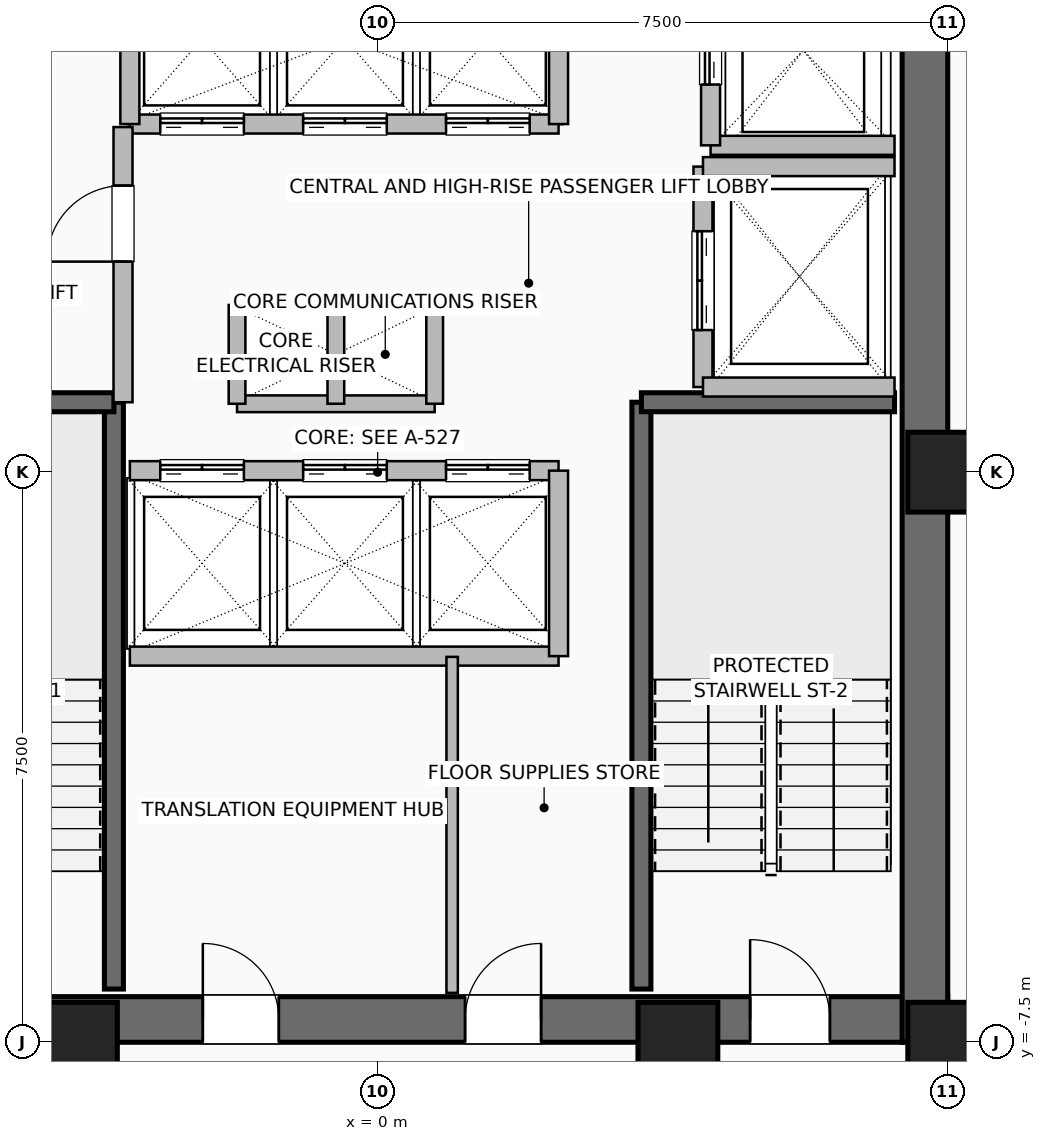
"""IFC4 building model, lengths in metres.
Left out: names, types, materials, properties, quantities, classifications, styles, units other than length and angle.
Written with IfcOpenShell. Run it as: python <this file> out.ifc"""

import sys

from ifc_helpers import new_model, si_unit, direction, frame, frame_2d, origin, origin_2d, place, context, subcontext, project, spatial, rectangle, hollow_rectangle, extrude, element, fill, save


model = new_model("IFC4")
c1 = context("Model", 3, precision=1e-05, world=origin(), true_north=direction((0.0, 1.0)))
c2 = subcontext(c1, "Body", "Model", "MODEL_VIEW")
j1 = project(units=[si_unit("LENGTHUNIT", "METRE"), si_unit("PLANEANGLEUNIT", "RADIAN")], contexts=[c1])
p1 = place(None, origin())
s1 = spatial("IfcSite", under=j1, at=p1, CompositionType="ELEMENT")
p2 = place(p1, origin())
s2 = spatial("IfcBuilding", under=s1, at=p2, CompositionType="ELEMENT")
p3 = place(p2, frame((0.0, 0.0, 104.8)))
s3 = spatial("IfcBuildingStorey", under=s2, at=p3, CompositionType="ELEMENT", Elevation=104.8)
for number, where, z_axis, x_axis in (
    (1, (-3.95, -7.5, 0.0), (0.0, 0.0, 1.0), (1.0, 0.0, 0.0)),
    (2, (3.95, -7.5, 0.0), (0.0, 0.0, 1.0), (1.0, 0.0, 0.0)),
    (3, (7.5, -7.5, 0.0), (0.0, 0.0, 1.0), (1.0, 0.0, 0.0)),
    (4, (7.5, 0.0, 0.0), (0.0, 0.0, 1.0), (1.0, 0.0, 0.0)),
):
    element("IfcColumn", number, at=place(p3, frame(where, z_axis=z_axis, x_axis=x_axis)), inside=s3, PredefinedType="COLUMN", context=c2, shape_type="SweptSolid", body=[
        extrude(hollow_rectangle(XDim=1.05, YDim=1.05, WallThickness=0.05, at=origin_2d()), origin(), (0.0, 0.0, 1.0), 3.6),
    ])
p4 = place(p3, frame((-7.5, -7.2, 0.0), z_axis=(0.0, 0.0, 1.0), x_axis=(1.0, 0.0, 0.0)))
e5 = element("IfcWall", 5, at=p4, inside=s3, PredefinedType="SHEAR", context=c2, shape_type="SweptSolid", body=[
    extrude(rectangle(XDim=15.0, YDim=0.6, at=frame_2d((7.5, 0.0))), origin(), (0.0, 0.0, 1.0), 3.36),
])
p5 = place(p4, frame((1.55, 0.0, 0.0)))
e6 = element("IfcOpeningElement", 6, at=p5, cuts=e5, PredefinedType="OPENING", context=c2, shape_type="SweptSolid", body=[
    extrude(rectangle(XDim=1.05, YDim=2.08, at=frame_2d((0.525, 1.04))), frame((0.0, 0.31, 0.0), z_axis=(0.0, -1.0, 0.0), x_axis=(1.0, 0.0, 0.0)), (0.0, 0.0, 1.0), 0.62),
])
p6 = place(p4, frame((12.4, 0.0, 0.0)))
e7 = element("IfcOpeningElement", 7, at=p6, cuts=e5, PredefinedType="OPENING", context=c2, shape_type="SweptSolid", body=[
    extrude(rectangle(XDim=1.05, YDim=2.08, at=frame_2d((0.525, 1.04))), frame((0.0, 0.31, 0.0), z_axis=(0.0, -1.0, 0.0), x_axis=(1.0, 0.0, 0.0)), (0.0, 0.0, 1.0), 0.62),
])
p7 = place(p4, frame((5.2, 0.0, 0.0)))
e8 = element("IfcOpeningElement", 8, at=p7, cuts=e5, PredefinedType="OPENING", context=c2, shape_type="SweptSolid", body=[
    extrude(rectangle(XDim=1.0, YDim=2.08, at=frame_2d((0.5, 1.04))), frame((0.0, 0.31, 0.0), z_axis=(0.0, -1.0, 0.0), x_axis=(1.0, 0.0, 0.0)), (0.0, 0.0, 1.0), 0.62),
])
p8 = place(p4, frame((8.65, 0.0, 0.0)))
e9 = element("IfcOpeningElement", 9, at=p8, cuts=e5, PredefinedType="OPENING", context=c2, shape_type="SweptSolid", body=[
    extrude(rectangle(XDim=1.0, YDim=2.08, at=frame_2d((0.5, 1.04))), frame((0.0, 0.31, 0.0), z_axis=(0.0, -1.0, 0.0), x_axis=(1.0, 0.0, 0.0)), (0.0, 0.0, 1.0), 0.62),
])
p9 = place(p3, frame((7.2, -7.5, 0.0), z_axis=(0.0, 0.0, 1.0), x_axis=(0.0, 1.0, 0.0)))
e10 = element("IfcWall", 10, at=p9, inside=s3, PredefinedType="SHEAR", context=c2, shape_type="SweptSolid", body=[
    extrude(rectangle(XDim=15.0, YDim=0.6, at=frame_2d((7.5, 0.0))), origin(), (0.0, 0.0, 1.0), 3.36),
])
p10 = place(p3, frame((-3.47, -6.8, 0.0), z_axis=(0.0, 0.0, 1.0), x_axis=(0.0, 1.0, 0.0)))
e11 = element("IfcWall", 11, at=p10, inside=s3, PredefinedType="SHEAR", context=c2, shape_type="SweptSolid", body=[
    extrude(rectangle(XDim=7.72, YDim=0.25, at=frame_2d((3.86, 0.0))), origin(), (0.0, 0.0, 1.0), 3.36),
])
p11 = place(p3, frame((-6.8, 0.92, 0.0), z_axis=(0.0, 0.0, 1.0), x_axis=(1.0, 0.0, 0.0)))
e12 = element("IfcWall", 12, at=p11, inside=s3, PredefinedType="SHEAR", context=c2, shape_type="SweptSolid", body=[
    extrude(rectangle(XDim=3.33, YDim=0.25, at=frame_2d((1.665, 0.0))), origin(), (0.0, 0.0, 1.0), 3.36),
])
p12 = place(p3, frame((3.47, -6.8, 0.0), z_axis=(0.0, 0.0, 1.0), x_axis=(0.0, 1.0, 0.0)))
e13 = element("IfcWall", 13, at=p12, inside=s3, PredefinedType="SHEAR", context=c2, shape_type="SweptSolid", body=[
    extrude(rectangle(XDim=7.72, YDim=0.25, at=frame_2d((3.86, 0.0))), origin(), (0.0, 0.0, 1.0), 3.36),
])
p13 = place(p3, frame((3.47, 0.92, 0.0), z_axis=(0.0, 0.0, 1.0), x_axis=(1.0, 0.0, 0.0)))
e14 = element("IfcWall", 14, at=p13, inside=s3, PredefinedType="SHEAR", context=c2, shape_type="SweptSolid", body=[
    extrude(rectangle(XDim=3.33, YDim=0.25, at=frame_2d((1.665, 0.0))), origin(), (0.0, 0.0, 1.0), 3.36),
])
for number, where, z_axis, x_axis in (
    (15, (-1.85, 2.2, 0.0), (0.0, 0.0, 1.0), (1.0, 0.0, 0.0)),
    (16, (-1.85, 0.9, 0.0), (0.0, 0.0, 1.0), (1.0, 0.0, 0.0)),
):
    element("IfcWall", number, at=place(p3, frame(where, z_axis=z_axis, x_axis=x_axis)), inside=s3, PredefinedType="PARTITIONING", context=c2, shape_type="SweptSolid", body=[
        extrude(rectangle(XDim=2.6, YDim=0.22, at=frame_2d((1.3, 0.0))), origin(), (0.0, 0.0, 1.0), 3.36),
    ])
for number, where, z_axis, x_axis in (
    (17, (-0.55, 0.9, 0.0), (0.0, 0.0, 1.0), (0.0, 1.0, 0.0)),
    (18, (0.75, 0.9, 0.0), (0.0, 0.0, 1.0), (0.0, 1.0, 0.0)),
    (19, (-1.85, 0.9, 0.0), (0.0, 0.0, 1.0), (0.0, 1.0, 0.0)),
):
    element("IfcWall", number, at=place(p3, frame(where, z_axis=z_axis, x_axis=x_axis)), inside=s3, PredefinedType="PARTITIONING", context=c2, shape_type="SweptSolid", body=[
        extrude(rectangle(XDim=1.3, YDim=0.22, at=frame_2d((0.65, 0.0))), origin(), (0.0, 0.0, 1.0), 3.36),
    ])
p14 = place(p3, frame((-3.26, 0.02, 0.0), z_axis=(0.0, 0.0, 1.0), x_axis=(1.0, 0.0, 0.0)))
e20 = element("IfcWall", 20, at=p14, inside=s3, PredefinedType="SHEAR", context=c2, shape_type="SweptSolid", body=[
    extrude(rectangle(XDim=5.64, YDim=0.25, at=frame_2d((2.82, 0.0))), origin(), (0.0, 0.0, 1.0), 3.36),
])
p15 = place(p14, frame((0.4, 0.0, 0.0)))
e21 = element("IfcOpeningElement", 21, at=p15, cuts=e20, PredefinedType="OPENING", context=c2, shape_type="SweptSolid", body=[
    extrude(rectangle(XDim=1.1, YDim=2.2, at=frame_2d((0.55, 1.1))), frame((0.0, 0.135, 0.0), z_axis=(0.0, -1.0, 0.0), x_axis=(1.0, 0.0, 0.0)), (0.0, 0.0, 1.0), 0.27),
])
p16 = place(p14, frame((2.28, 0.0, 0.0)))
e22 = element("IfcOpeningElement", 22, at=p16, cuts=e20, PredefinedType="OPENING", context=c2, shape_type="SweptSolid", body=[
    extrude(rectangle(XDim=1.1, YDim=2.2, at=frame_2d((0.55, 1.1))), frame((0.0, 0.135, 0.0), z_axis=(0.0, -1.0, 0.0), x_axis=(1.0, 0.0, 0.0)), (0.0, 0.0, 1.0), 0.27),
])
p17 = place(p14, frame((4.16, 0.0, 0.0)))
e23 = element("IfcOpeningElement", 23, at=p17, cuts=e20, PredefinedType="OPENING", context=c2, shape_type="SweptSolid", body=[
    extrude(rectangle(XDim=1.1, YDim=2.2, at=frame_2d((0.55, 1.1))), frame((0.0, 0.135, 0.0), z_axis=(0.0, -1.0, 0.0), x_axis=(1.0, 0.0, 0.0)), (0.0, 0.0, 1.0), 0.27),
])
p18 = place(p3, frame((-3.26, -2.42, 0.0), z_axis=(0.0, 0.0, 1.0), x_axis=(1.0, 0.0, 0.0)))
e24 = element("IfcWall", 24, at=p18, inside=s3, PredefinedType="SHEAR", context=c2, shape_type="SweptSolid", body=[
    extrude(rectangle(XDim=5.64, YDim=0.25, at=frame_2d((2.82, 0.0))), origin(), (0.0, 0.0, 1.0), 3.36),
])
p19 = place(p3, frame((2.38, -2.42, 0.0), z_axis=(0.0, 0.0, 1.0), x_axis=(0.0, 1.0, 0.0)))
e25 = element("IfcWall", 25, at=p19, inside=s3, PredefinedType="SHEAR", context=c2, shape_type="SweptSolid", body=[
    extrude(rectangle(XDim=2.44, YDim=0.25, at=frame_2d((1.22, 0.0))), origin(), (0.0, 0.0, 1.0), 3.36),
])
p20 = place(p3, frame((-3.26, 4.58, 0.0), z_axis=(0.0, 0.0, 1.0), x_axis=(1.0, 0.0, 0.0)))
e26 = element("IfcWall", 26, at=p20, inside=s3, PredefinedType="SHEAR", context=c2, shape_type="SweptSolid", body=[
    extrude(rectangle(XDim=5.64, YDim=0.25, at=frame_2d((2.82, 0.0))), origin(), (0.0, 0.0, 1.0), 3.36),
])
p21 = place(p20, frame((0.4, 0.0, 0.0)))
e27 = element("IfcOpeningElement", 27, at=p21, cuts=e26, PredefinedType="OPENING", context=c2, shape_type="SweptSolid", body=[
    extrude(rectangle(XDim=1.1, YDim=2.2, at=frame_2d((0.55, 1.1))), frame((0.0, 0.135, 0.0), z_axis=(0.0, -1.0, 0.0), x_axis=(1.0, 0.0, 0.0)), (0.0, 0.0, 1.0), 0.27),
])
p22 = place(p20, frame((2.28, 0.0, 0.0)))
e28 = element("IfcOpeningElement", 28, at=p22, cuts=e26, PredefinedType="OPENING", context=c2, shape_type="SweptSolid", body=[
    extrude(rectangle(XDim=1.1, YDim=2.2, at=frame_2d((0.55, 1.1))), frame((0.0, 0.135, 0.0), z_axis=(0.0, -1.0, 0.0), x_axis=(1.0, 0.0, 0.0)), (0.0, 0.0, 1.0), 0.27),
])
p23 = place(p20, frame((4.16, 0.0, 0.0)))
e29 = element("IfcOpeningElement", 29, at=p23, cuts=e26, PredefinedType="OPENING", context=c2, shape_type="SweptSolid", body=[
    extrude(rectangle(XDim=1.1, YDim=2.2, at=frame_2d((0.55, 1.1))), frame((0.0, 0.135, 0.0), z_axis=(0.0, -1.0, 0.0), x_axis=(1.0, 0.0, 0.0)), (0.0, 0.0, 1.0), 0.27),
])
for number, where, z_axis, x_axis in (
    (30, (-3.26, 4.58, 0.0), (0.0, 0.0, 1.0), (0.0, 1.0, 0.0)),
    (31, (2.38, 4.58, 0.0), (0.0, 0.0, 1.0), (0.0, 1.0, 0.0)),
):
    element("IfcWall", number, at=place(p3, frame(where, z_axis=z_axis, x_axis=x_axis)), inside=s3, PredefinedType="SHEAR", context=c2, shape_type="SweptSolid", body=[
        extrude(rectangle(XDim=2.22, YDim=0.25, at=frame_2d((1.11, 0.0))), origin(), (0.0, 0.0, 1.0), 3.36),
    ])
p24 = place(p3, frame((4.38, 4.3, 0.0), z_axis=(0.0, 0.0, 1.0), x_axis=(1.0, 0.0, 0.0)))
e32 = element("IfcWall", 32, at=p24, inside=s3, PredefinedType="SHEAR", context=c2, shape_type="SweptSolid", body=[
    extrude(rectangle(XDim=2.42, YDim=0.25, at=frame_2d((1.21, 0.0))), origin(), (0.0, 0.0, 1.0), 3.36),
])
p25 = place(p3, frame((4.38, 4.3, 0.0), z_axis=(0.0, 0.0, 1.0), x_axis=(0.0, 1.0, 0.0)))
e33 = element("IfcWall", 33, at=p25, inside=s3, PredefinedType="SHEAR", context=c2, shape_type="SweptSolid", body=[
    extrude(rectangle(XDim=2.5, YDim=0.25, at=frame_2d((1.25, 0.0))), origin(), (0.0, 0.0, 1.0), 3.36),
])
p26 = place(p25, frame((0.8, 0.0, 0.0)))
e34 = element("IfcOpeningElement", 34, at=p26, cuts=e33, PredefinedType="OPENING", context=c2, shape_type="SweptSolid", body=[
    extrude(rectangle(XDim=1.2, YDim=2.2, at=frame_2d((0.6, 1.1))), frame((0.0, 0.135, 0.0), z_axis=(0.0, -1.0, 0.0), x_axis=(1.0, 0.0, 0.0)), (0.0, 0.0, 1.0), 0.27),
])
p27 = place(p3, frame((4.28, 1.12, 0.0), z_axis=(0.0, 0.0, 1.0), x_axis=(0.0, 1.0, 0.0)))
e35 = element("IfcWall", 35, at=p27, inside=s3, PredefinedType="SHEAR", context=c2, shape_type="SweptSolid", body=[
    extrude(rectangle(XDim=2.9, YDim=0.25, at=frame_2d((1.45, 0.0))), origin(), (0.0, 0.0, 1.0), 3.36),
])
p28 = place(p27, frame((0.75, 0.0, 0.0)))
e36 = element("IfcOpeningElement", 36, at=p28, cuts=e35, PredefinedType="OPENING", context=c2, shape_type="SweptSolid", body=[
    extrude(rectangle(XDim=1.3, YDim=2.3, at=frame_2d((0.65, 1.15))), frame((0.0, 0.135, 0.0), z_axis=(0.0, -1.0, 0.0), x_axis=(1.0, 0.0, 0.0)), (0.0, 0.0, 1.0), 0.27),
])
for number, where, z_axis, x_axis in (
    (37, (4.28, 1.12, 0.0), (0.0, 0.0, 1.0), (1.0, 0.0, 0.0)),
    (38, (4.28, 4.02, 0.0), (0.0, 0.0, 1.0), (1.0, 0.0, 0.0)),
):
    element("IfcWall", number, at=place(p3, frame(where, z_axis=z_axis, x_axis=x_axis)), inside=s3, PredefinedType="SHEAR", context=c2, shape_type="SweptSolid", body=[
        extrude(rectangle(XDim=2.52, YDim=0.25, at=frame_2d((1.26, 0.0))), origin(), (0.0, 0.0, 1.0), 3.36),
    ])
p29 = place(p3, frame((-3.35, 0.92, 0.0), z_axis=(0.0, 0.0, 1.0), x_axis=(0.0, 1.0, 0.0)))
e39 = element("IfcWall", 39, at=p29, inside=s3, PredefinedType="SHEAR", context=c2, shape_type="SweptSolid", body=[
    extrude(rectangle(XDim=3.62, YDim=0.25, at=frame_2d((1.81, 0.0))), origin(), (0.0, 0.0, 1.0), 3.36),
])
p30 = place(p29, frame((1.85, 0.0, 0.0)))
e40 = element("IfcOpeningElement", 40, at=p30, cuts=e39, PredefinedType="OPENING", context=c2, shape_type="SweptSolid", body=[
    extrude(rectangle(XDim=1.0, YDim=2.08, at=frame_2d((0.5, 1.04))), frame((0.0, 0.135, 0.0), z_axis=(0.0, -1.0, 0.0), x_axis=(1.0, 0.0, 0.0)), (0.0, 0.0, 1.0), 0.27),
])
p31 = place(p3, frame((0.98, -6.85, 0.0), z_axis=(0.0, 0.0, 1.0), x_axis=(0.0, 1.0, 0.0)))
e41 = element("IfcWall", 41, at=p31, inside=s3, PredefinedType="PARTITIONING", context=c2, shape_type="SweptSolid", body=[
    extrude(rectangle(XDim=4.42, YDim=0.15, at=frame_2d((2.21, 0.0))), origin(), (0.0, 0.0, 1.0), 3.36),
])
p32 = place(p3, frame((7.45, -7.48, 0.0), z_axis=(0.0, 0.0, 1.0), x_axis=(1.0, 0.0, 0.0)))
e42 = element("IfcWall", 42, at=p32, inside=s3, PredefinedType="PARTITIONING", context=c2, shape_type="SweptSolid", body=[
    extrude(rectangle(XDim=0.95, YDim=0.15, at=frame_2d((0.475, 0.0))), origin(), (0.0, 0.0, 1.0), 3.36),
])
p33 = place(p6, origin())
e43 = element("IfcDoor", 43, at=p33, inside=s3, OperationType="SINGLE_SWING_LEFT", PredefinedType="DOOR", context=c2, shape_type="SweptSolid", body=[
    extrude(rectangle(XDim=1.05, YDim=2.08, at=frame_2d((0.525, 1.04))), frame((0.0, 0.025, 0.0), z_axis=(0.0, -1.0, 0.0), x_axis=(1.0, 0.0, 0.0)), (0.0, 0.0, 1.0), 0.05),
])
fill(e7, e43)
p34 = place(p7, origin())
e44 = element("IfcDoor", 44, at=p34, inside=s3, OperationType="SINGLE_SWING_LEFT", PredefinedType="DOOR", context=c2, shape_type="SweptSolid", body=[
    extrude(rectangle(XDim=1.0, YDim=2.08, at=frame_2d((0.5, 1.04))), frame((0.0, 0.025, 0.0), z_axis=(0.0, -1.0, 0.0), x_axis=(1.0, 0.0, 0.0)), (0.0, 0.0, 1.0), 0.05),
])
fill(e8, e44)
p35 = place(p8, origin())
e45 = element("IfcDoor", 45, at=p35, inside=s3, OperationType="SINGLE_SWING_RIGHT", PredefinedType="DOOR", context=c2, shape_type="SweptSolid", body=[
    extrude(rectangle(XDim=1.0, YDim=2.08, at=frame_2d((0.5, 1.04))), frame((0.0, 0.025, 0.0), z_axis=(0.0, -1.0, 0.0), x_axis=(1.0, 0.0, 0.0)), (0.0, 0.0, 1.0), 0.05),
])
fill(e9, e45)
p36 = place(p15, origin())
e46 = element("IfcDoor", 46, at=p36, inside=s3, OperationType="DOUBLE_DOOR_SLIDING", PredefinedType="DOOR", context=c2, shape_type="SweptSolid", body=[
    extrude(rectangle(XDim=1.1, YDim=2.2, at=frame_2d((0.55, 1.1))), frame((0.0, 0.025, 0.0), z_axis=(0.0, -1.0, 0.0), x_axis=(1.0, 0.0, 0.0)), (0.0, 0.0, 1.0), 0.05),
])
fill(e21, e46)
p37 = place(p16, origin())
e47 = element("IfcDoor", 47, at=p37, inside=s3, OperationType="DOUBLE_DOOR_SLIDING", PredefinedType="DOOR", context=c2, shape_type="SweptSolid", body=[
    extrude(rectangle(XDim=1.1, YDim=2.2, at=frame_2d((0.55, 1.1))), frame((0.0, 0.025, 0.0), z_axis=(0.0, -1.0, 0.0), x_axis=(1.0, 0.0, 0.0)), (0.0, 0.0, 1.0), 0.05),
])
fill(e22, e47)
p38 = place(p17, origin())
e48 = element("IfcDoor", 48, at=p38, inside=s3, OperationType="DOUBLE_DOOR_SLIDING", PredefinedType="DOOR", context=c2, shape_type="SweptSolid", body=[
    extrude(rectangle(XDim=1.1, YDim=2.2, at=frame_2d((0.55, 1.1))), frame((0.0, 0.025, 0.0), z_axis=(0.0, -1.0, 0.0), x_axis=(1.0, 0.0, 0.0)), (0.0, 0.0, 1.0), 0.05),
])
fill(e23, e48)
p39 = place(p21, origin())
e49 = element("IfcDoor", 49, at=p39, inside=s3, OperationType="DOUBLE_DOOR_SLIDING", PredefinedType="DOOR", context=c2, shape_type="SweptSolid", body=[
    extrude(rectangle(XDim=1.1, YDim=2.2, at=frame_2d((0.55, 1.1))), frame((0.0, 0.025, 0.0), z_axis=(0.0, -1.0, 0.0), x_axis=(1.0, 0.0, 0.0)), (0.0, 0.0, 1.0), 0.05),
])
fill(e27, e49)
p40 = place(p22, origin())
e50 = element("IfcDoor", 50, at=p40, inside=s3, OperationType="DOUBLE_DOOR_SLIDING", PredefinedType="DOOR", context=c2, shape_type="SweptSolid", body=[
    extrude(rectangle(XDim=1.1, YDim=2.2, at=frame_2d((0.55, 1.1))), frame((0.0, 0.025, 0.0), z_axis=(0.0, -1.0, 0.0), x_axis=(1.0, 0.0, 0.0)), (0.0, 0.0, 1.0), 0.05),
])
fill(e28, e50)
p41 = place(p23, origin())
e51 = element("IfcDoor", 51, at=p41, inside=s3, OperationType="DOUBLE_DOOR_SLIDING", PredefinedType="DOOR", context=c2, shape_type="SweptSolid", body=[
    extrude(rectangle(XDim=1.1, YDim=2.2, at=frame_2d((0.55, 1.1))), frame((0.0, 0.025, 0.0), z_axis=(0.0, -1.0, 0.0), x_axis=(1.0, 0.0, 0.0)), (0.0, 0.0, 1.0), 0.05),
])
fill(e29, e51)
p42 = place(p26, origin())
e52 = element("IfcDoor", 52, at=p42, inside=s3, OperationType="DOUBLE_DOOR_SLIDING", PredefinedType="DOOR", context=c2, shape_type="SweptSolid", body=[
    extrude(rectangle(XDim=1.2, YDim=2.2, at=frame_2d((0.6, 1.1))), frame((0.0, 0.025, 0.0), z_axis=(0.0, -1.0, 0.0), x_axis=(1.0, 0.0, 0.0)), (0.0, 0.0, 1.0), 0.05),
])
fill(e34, e52)
p43 = place(p28, origin())
e53 = element("IfcDoor", 53, at=p43, inside=s3, OperationType="DOUBLE_DOOR_SLIDING", PredefinedType="DOOR", context=c2, shape_type="SweptSolid", body=[
    extrude(rectangle(XDim=1.3, YDim=2.3, at=frame_2d((0.65, 1.15))), frame((0.0, 0.025, 0.0), z_axis=(0.0, -1.0, 0.0), x_axis=(1.0, 0.0, 0.0)), (0.0, 0.0, 1.0), 0.05),
])
fill(e36, e53)
p44 = place(p30, origin())
e54 = element("IfcDoor", 54, at=p44, inside=s3, OperationType="SINGLE_SWING_LEFT", PredefinedType="DOOR", context=c2, shape_type="SweptSolid", body=[
    extrude(rectangle(XDim=1.0, YDim=2.08, at=frame_2d((0.5, 1.04))), frame((0.0, 0.025, 0.0), z_axis=(0.0, -1.0, 0.0), x_axis=(1.0, 0.0, 0.0)), (0.0, 0.0, 1.0), 0.05),
])
fill(e40, e54)
save(model, sys.argv[1])
